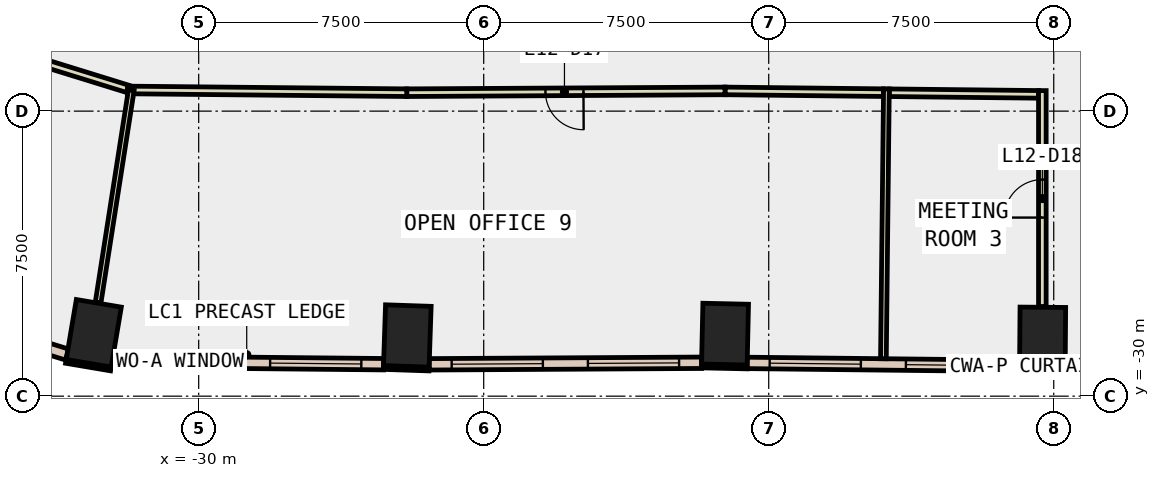
"""IFC4 building model, lengths in metres.
Left out: names, types, materials, properties, quantities, classifications, styles, units other than length and angle.
Written with IfcOpenShell. Run it as: python <this file> out.ifc"""

import sys

from ifc_helpers import new_model, si_unit, direction, frame, frame_2d, origin, origin_2d, place, context, subcontext, project, spatial, rectangle, extrude, element, fill, save


model = new_model("IFC4")
c1 = context("Model", 3, precision=1e-05, world=origin(), true_north=direction((0.0, 1.0)))
c2 = subcontext(c1, "Body", "Model", "MODEL_VIEW")
j1 = project(units=[si_unit("LENGTHUNIT", "METRE"), si_unit("PLANEANGLEUNIT", "RADIAN")], contexts=[c1])
p1 = place(None, origin())
s1 = spatial("IfcSite", under=j1, at=p1, CompositionType="ELEMENT")
p2 = place(p1, origin())
s2 = spatial("IfcBuilding", under=s1, at=p2, CompositionType="ELEMENT")
p3 = place(p2, frame((0.0, 0.0, 60.2)))
s3 = spatial("IfcBuildingStorey", under=s2, at=p3, CompositionType="ELEMENT", Elevation=60.2)
for number, where, z_axis, x_axis in (
    (1, (-32.761, -28.346, -0.4), (0.0, 0.0, 1.0), (-0.986, 0.167, 0.0)),
    (2, (-24.51, -28.416, -0.4), (0.0, 0.0, 1.0), (-0.999, 0.034, 0.0)),
    (3, (-16.15, -28.368, -0.4), (0.0, 0.0, 1.0), (-1.0, 0.022, 0.0)),
    (4, (-7.793, -28.461, -0.4), (0.0, 0.0, 1.0), (-1.0, 0.008, 0.0)),
):
    element("IfcColumn", number, at=place(p3, frame(where, z_axis=z_axis, x_axis=x_axis)), inside=s3, PredefinedType="COLUMN", context=c2, shape_type="SweptSolid", body=[
        extrude(rectangle(XDim=1.2, YDim=1.6, at=origin_2d()), origin(), (0.0, 0.0, 1.0), 4.2),
    ])
for number, where, z_axis, x_axis in (
    (5, (-33.494, -29.084, 0.0), (0.0, 0.0, 1.0), (0.986, -0.167, 0.0)),
    (6, (-25.138, -29.245, 0.0), (0.0, 0.0, 1.0), (0.999, -0.033, 0.0)),
):
    element("IfcWall", number, at=place(p3, frame(where, z_axis=z_axis, x_axis=x_axis)), inside=s3, PredefinedType="STANDARD", context=c2, shape_type="SweptSolid", body=[
        extrude(rectangle(XDim=1.2, YDim=0.1, at=frame_2d((0.6, 0.0))), origin(), (0.0, 0.0, 1.0), 3.8),
    ])
p4 = place(p3, frame((-16.769, -29.205, 0.0), z_axis=(0.0, 0.0, 1.0), x_axis=(0.99976752127, -0.021561618973, 0.0)))
e7 = element("IfcWall", 7, at=p4, inside=s3, PredefinedType="STANDARD", context=c2, shape_type="SweptSolid", body=[
    extrude(rectangle(XDim=1.2, YDim=0.1, at=frame_2d((0.6, 0.0))), origin(), (0.0, 0.0, 1.0), 3.8),
])
p5 = place(p3, frame((-8.4, -29.306, 0.0), z_axis=(0.0, 0.0, 1.0), x_axis=(0.999965208912, -0.008341520563, 0.0)))
e8 = element("IfcWall", 8, at=p5, inside=s3, PredefinedType="STANDARD", context=c2, shape_type="SweptSolid", body=[
    extrude(rectangle(XDim=1.2, YDim=0.1, at=frame_2d((0.6, 0.0))), origin(), (0.0, 0.0, 1.0), 3.8),
])
p6 = place(p3, frame((-32.279, -29.089, 0.0), z_axis=(0.0, 0.0, 1.0), x_axis=(0.999952253205, -0.009771965572, 0.0)))
e9 = element("IfcWall", 9, at=p6, inside=s3, PredefinedType="STANDARD", context=c2, shape_type="SweptSolid", body=[
    extrude(rectangle(XDim=7.145, YDim=0.3, at=frame_2d((3.573, 0.0))), origin(), (0.0, 0.0, 1.0), 3.8),
])
p7 = place(p6, frame((0.586, 0.0, 0.9)))
e10 = element("IfcOpeningElement", 10, at=p7, cuts=e9, PredefinedType="OPENING", context=c2, shape_type="SweptSolid", body=[
    extrude(rectangle(XDim=2.4, YDim=2.6, at=frame_2d((1.2, 1.3))), frame((0.0, 0.16, 0.0), z_axis=(0.0, -1.0, 0.0), x_axis=(1.0, 0.0, 0.0)), (0.0, 0.0, 1.0), 0.32),
])
p8 = place(p6, frame((4.159, 0.0, 0.9)))
e11 = element("IfcOpeningElement", 11, at=p8, cuts=e9, PredefinedType="OPENING", context=c2, shape_type="SweptSolid", body=[
    extrude(rectangle(XDim=2.4, YDim=2.6, at=frame_2d((1.2, 1.3))), frame((0.0, 0.16, 0.0), z_axis=(0.0, -1.0, 0.0), x_axis=(1.0, 0.0, 0.0)), (0.0, 0.0, 1.0), 0.32),
])
p9 = place(p3, frame((-23.936, -29.162, 0.0), z_axis=(0.0, 0.0, 1.0), x_axis=(0.999983638272, 0.005720418525, 0.0)))
e12 = element("IfcWall", 12, at=p9, inside=s3, PredefinedType="STANDARD", context=c2, shape_type="SweptSolid", body=[
    extrude(rectangle(XDim=7.17, YDim=0.3, at=frame_2d((3.585, 0.0))), origin(), (0.0, 0.0, 1.0), 3.8),
])
p10 = place(p9, frame((0.593, 0.0, 0.9)))
e13 = element("IfcOpeningElement", 13, at=p10, cuts=e12, PredefinedType="OPENING", context=c2, shape_type="SweptSolid", body=[
    extrude(rectangle(XDim=2.4, YDim=2.6, at=frame_2d((1.2, 1.3))), frame((0.0, 0.16, 0.0), z_axis=(0.0, -1.0, 0.0), x_axis=(1.0, 0.0, 0.0)), (0.0, 0.0, 1.0), 0.32),
])
p11 = place(p9, frame((4.178, 0.0, 0.9)))
e14 = element("IfcOpeningElement", 14, at=p11, cuts=e12, PredefinedType="OPENING", context=c2, shape_type="SweptSolid", body=[
    extrude(rectangle(XDim=2.4, YDim=2.6, at=frame_2d((1.2, 1.3))), frame((0.0, 0.16, 0.0), z_axis=(0.0, -1.0, 0.0), x_axis=(1.0, 0.0, 0.0)), (0.0, 0.0, 1.0), 0.32),
])
p12 = place(p3, frame((-15.568, -29.125, 0.0), z_axis=(0.0, 0.0, 1.0), x_axis=(0.999939152594, -0.011031369316, 0.0)))
e15 = element("IfcWall", 15, at=p12, inside=s3, PredefinedType="STANDARD", context=c2, shape_type="SweptSolid", body=[
    extrude(rectangle(XDim=7.171, YDim=0.3, at=frame_2d((3.585, 0.0))), origin(), (0.0, 0.0, 1.0), 3.8),
])
p13 = place(p12, frame((0.593, 0.0, 0.9)))
e16 = element("IfcOpeningElement", 16, at=p13, cuts=e15, PredefinedType="OPENING", context=c2, shape_type="SweptSolid", body=[
    extrude(rectangle(XDim=2.4, YDim=2.6, at=frame_2d((1.2, 1.3))), frame((0.0, 0.16, 0.0), z_axis=(0.0, -1.0, 0.0), x_axis=(1.0, 0.0, 0.0)), (0.0, 0.0, 1.0), 0.32),
])
p14 = place(p12, frame((4.178, 0.0, 0.9)))
e17 = element("IfcOpeningElement", 17, at=p14, cuts=e15, PredefinedType="OPENING", context=c2, shape_type="SweptSolid", body=[
    extrude(rectangle(XDim=2.4, YDim=2.6, at=frame_2d((1.2, 1.3))), frame((0.0, 0.16, 0.0), z_axis=(0.0, -1.0, 0.0), x_axis=(1.0, 0.0, 0.0)), (0.0, 0.0, 1.0), 0.32),
])
p15 = place(p3, frame((-37.254, -27.732, 0.0), z_axis=(0.0, 0.0, 1.0), x_axis=(0.955308230541, -0.295611543518, 0.0)))
e18 = element("IfcWall", 18, at=p15, inside=s3, PredefinedType="STANDARD", context=c2, shape_type="SweptSolid", body=[
    extrude(rectangle(XDim=3.968, YDim=0.3, at=frame_2d((1.984, 0.0))), origin(), (0.0, 0.0, 1.0), 3.8),
])
p16 = place(p15, frame((1.284, 0.0, 0.9)))
e19 = element("IfcOpeningElement", 19, at=p16, cuts=e18, PredefinedType="OPENING", context=c2, shape_type="SweptSolid", body=[
    extrude(rectangle(XDim=1.4, YDim=2.6, at=frame_2d((0.7, 1.3))), frame((0.0, 0.16, 0.0), z_axis=(0.0, -1.0, 0.0), x_axis=(1.0, 0.0, 0.0)), (0.0, 0.0, 1.0), 0.32),
])
p17 = place(p3, frame((-31.868, -21.914, 0.0), z_axis=(0.0, 0.0, 1.0), x_axis=(-0.955329505989, 0.295542780299, 0.0)))
e20 = element("IfcWall", 20, at=p17, inside=s3, PredefinedType="PARTITIONING", context=c2, shape_type="SweptSolid", body=[
    extrude(rectangle(XDim=2.484, YDim=0.2, at=frame_2d((1.242, 0.0))), origin(), (0.0, 0.0, 1.0), 3.8),
])
p18 = place(p3, frame((-11.979, -22.014, 0.0), z_axis=(0.0, 0.0, 1.0), x_axis=(-0.999939456554, 0.01100378236, 0.0)))
e21 = element("IfcWall", 21, at=p18, inside=s3, PredefinedType="PARTITIONING", context=c2, shape_type="SweptSolid", body=[
    extrude(rectangle(XDim=4.171, YDim=0.2, at=frame_2d((2.085, 0.0))), origin(), (0.0, 0.0, 1.0), 3.8),
])
p19 = place(p3, frame((-16.15, -21.968, 0.0), z_axis=(0.0, 0.0, 1.0), x_axis=(-0.99998433708, -0.00559692726, 0.0)))
e22 = element("IfcWall", 22, at=p19, inside=s3, PredefinedType="PARTITIONING", context=c2, shape_type="SweptSolid", body=[
    extrude(rectangle(XDim=8.375, YDim=0.2, at=frame_2d((4.188, 0.0))), origin(), (0.0, 0.0, 1.0), 3.8),
])
p20 = place(p19, frame((3.725, 0.0, 0.0)))
e23 = element("IfcOpeningElement", 23, at=p20, cuts=e22, PredefinedType="OPENING", context=c2, shape_type="SweptSolid", body=[
    extrude(rectangle(XDim=1.0, YDim=2.1, at=frame_2d((0.5, 1.05))), frame((0.0, 0.11, 0.0), z_axis=(0.0, -1.0, 0.0), x_axis=(1.0, 0.0, 0.0)), (0.0, 0.0, 1.0), 0.22),
])
p21 = place(p3, frame((-24.525, -22.015, 0.0), z_axis=(0.0, 0.0, 1.0), x_axis=(-0.999952295614, 0.009767624922, 0.0)))
e24 = element("IfcWall", 24, at=p21, inside=s3, PredefinedType="PARTITIONING", context=c2, shape_type="SweptSolid", body=[
    extrude(rectangle(XDim=7.348, YDim=0.2, at=frame_2d((3.674, 0.0))), origin(), (0.0, 0.0, 1.0), 3.8),
])
p22 = place(p3, frame((-7.9, -22.059, 0.0), z_axis=(0.0, 0.0, 1.0), x_axis=(-0.999940210022, 0.010935098606, 0.0)))
e25 = element("IfcWall", 25, at=p22, inside=s3, PredefinedType="PARTITIONING", context=c2, shape_type="SweptSolid", body=[
    extrude(rectangle(XDim=3.929, YDim=0.2, at=frame_2d((1.965, 0.0))), origin(), (0.0, 0.0, 1.0), 3.8),
])
p23 = place(p3, frame((-7.8, -27.641, 0.0), z_axis=(0.0, 0.0, 1.0), x_axis=(0.0, 1.0, 0.0)))
e26 = element("IfcWall", 26, at=p23, inside=s3, PredefinedType="PARTITIONING", context=c2, shape_type="SweptSolid", body=[
    extrude(rectangle(XDim=5.681, YDim=0.2, at=frame_2d((2.841, 0.0))), origin(), (0.0, 0.0, 1.0), 3.8),
])
p24 = place(p23, frame((2.34, 0.0, 0.0)))
e27 = element("IfcOpeningElement", 27, at=p24, cuts=e26, PredefinedType="OPENING", context=c2, shape_type="SweptSolid", body=[
    extrude(rectangle(XDim=1.0, YDim=2.1, at=frame_2d((0.5, 1.05))), frame((0.0, 0.11, 0.0), z_axis=(0.0, -1.0, 0.0), x_axis=(1.0, 0.0, 0.0)), (0.0, 0.0, 1.0), 0.22),
])
p25 = place(p3, frame((-31.773, -21.944, 0.0), z_axis=(0.0, 0.0, 1.0), x_axis=(-0.154313693693, -0.988021904585, 0.0)))
e28 = element("IfcWall", 28, at=p25, inside=s3, PredefinedType="PARTITIONING", context=c2, shape_type="SweptSolid", body=[
    extrude(rectangle(XDim=5.658, YDim=0.15, at=frame_2d((2.829, 0.0))), origin(), (0.0, 0.0, 1.0), 3.8),
])
p26 = place(p3, frame((-11.903, -21.915, 0.0), z_axis=(0.0, 0.0, 1.0), x_axis=(-0.011106223261, -0.999938324, 0.0)))
e29 = element("IfcWall", 29, at=p26, inside=s3, PredefinedType="PARTITIONING", context=c2, shape_type="SweptSolid", body=[
    extrude(rectangle(XDim=7.1, YDim=0.15, at=frame_2d((3.55, 0.0))), origin(), (0.0, 0.0, 1.0), 3.8),
])
p27 = place(p7, origin())
e30 = element("IfcWindow", 30, at=p27, inside=s3, PartitioningType="SINGLE_PANEL", PredefinedType="WINDOW", context=c2, shape_type="SweptSolid", body=[
    extrude(rectangle(XDim=2.4, YDim=2.6, at=frame_2d((1.2, 1.3))), frame((0.0, 0.03, 0.0), z_axis=(0.0, -1.0, 0.0), x_axis=(1.0, 0.0, 0.0)), (0.0, 0.0, 1.0), 0.06),
])
fill(e10, e30)
p28 = place(p8, origin())
e31 = element("IfcWindow", 31, at=p28, inside=s3, PartitioningType="SINGLE_PANEL", PredefinedType="WINDOW", context=c2, shape_type="SweptSolid", body=[
    extrude(rectangle(XDim=2.4, YDim=2.6, at=frame_2d((1.2, 1.3))), frame((0.0, 0.03, 0.0), z_axis=(0.0, -1.0, 0.0), x_axis=(1.0, 0.0, 0.0)), (0.0, 0.0, 1.0), 0.06),
])
fill(e11, e31)
p29 = place(p10, origin())
e32 = element("IfcWindow", 32, at=p29, inside=s3, PartitioningType="SINGLE_PANEL", PredefinedType="WINDOW", context=c2, shape_type="SweptSolid", body=[
    extrude(rectangle(XDim=2.4, YDim=2.6, at=frame_2d((1.2, 1.3))), frame((0.0, 0.03, 0.0), z_axis=(0.0, -1.0, 0.0), x_axis=(1.0, 0.0, 0.0)), (0.0, 0.0, 1.0), 0.06),
])
fill(e13, e32)
p30 = place(p11, origin())
e33 = element("IfcWindow", 33, at=p30, inside=s3, PartitioningType="SINGLE_PANEL", PredefinedType="WINDOW", context=c2, shape_type="SweptSolid", body=[
    extrude(rectangle(XDim=2.4, YDim=2.6, at=frame_2d((1.2, 1.3))), frame((0.0, 0.03, 0.0), z_axis=(0.0, -1.0, 0.0), x_axis=(1.0, 0.0, 0.0)), (0.0, 0.0, 1.0), 0.06),
])
fill(e14, e33)
p31 = place(p13, origin())
e34 = element("IfcWindow", 34, at=p31, inside=s3, PartitioningType="SINGLE_PANEL", PredefinedType="WINDOW", context=c2, shape_type="SweptSolid", body=[
    extrude(rectangle(XDim=2.4, YDim=2.6, at=frame_2d((1.2, 1.3))), frame((0.0, 0.03, 0.0), z_axis=(0.0, -1.0, 0.0), x_axis=(1.0, 0.0, 0.0)), (0.0, 0.0, 1.0), 0.06),
])
fill(e16, e34)
p32 = place(p14, origin())
e35 = element("IfcWindow", 35, at=p32, inside=s3, PartitioningType="SINGLE_PANEL", PredefinedType="WINDOW", context=c2, shape_type="SweptSolid", body=[
    extrude(rectangle(XDim=2.4, YDim=2.6, at=frame_2d((1.2, 1.3))), frame((0.0, 0.03, 0.0), z_axis=(0.0, -1.0, 0.0), x_axis=(1.0, 0.0, 0.0)), (0.0, 0.0, 1.0), 0.06),
])
fill(e17, e35)
p33 = place(p20, origin())
e36 = element("IfcDoor", 36, at=p33, inside=s3, OperationType="SINGLE_SWING_RIGHT", PredefinedType="DOOR", context=c2, shape_type="SweptSolid", body=[
    extrude(rectangle(XDim=1.0, YDim=2.1, at=frame_2d((0.5, 1.05))), frame((0.0, 0.025, 0.0), z_axis=(0.0, -1.0, 0.0), x_axis=(1.0, 0.0, 0.0)), (0.0, 0.0, 1.0), 0.05),
])
fill(e23, e36)
p34 = place(p24, origin())
e37 = element("IfcDoor", 37, at=p34, inside=s3, OperationType="SINGLE_SWING_LEFT", PredefinedType="DOOR", context=c2, shape_type="SweptSolid", body=[
    extrude(rectangle(XDim=1.0, YDim=2.1, at=frame_2d((0.5, 1.05))), frame((0.0, 0.025, 0.0), z_axis=(0.0, -1.0, 0.0), x_axis=(1.0, 0.0, 0.0)), (0.0, 0.0, 1.0), 0.05),
])
fill(e27, e37)
save(model, sys.argv[1])
